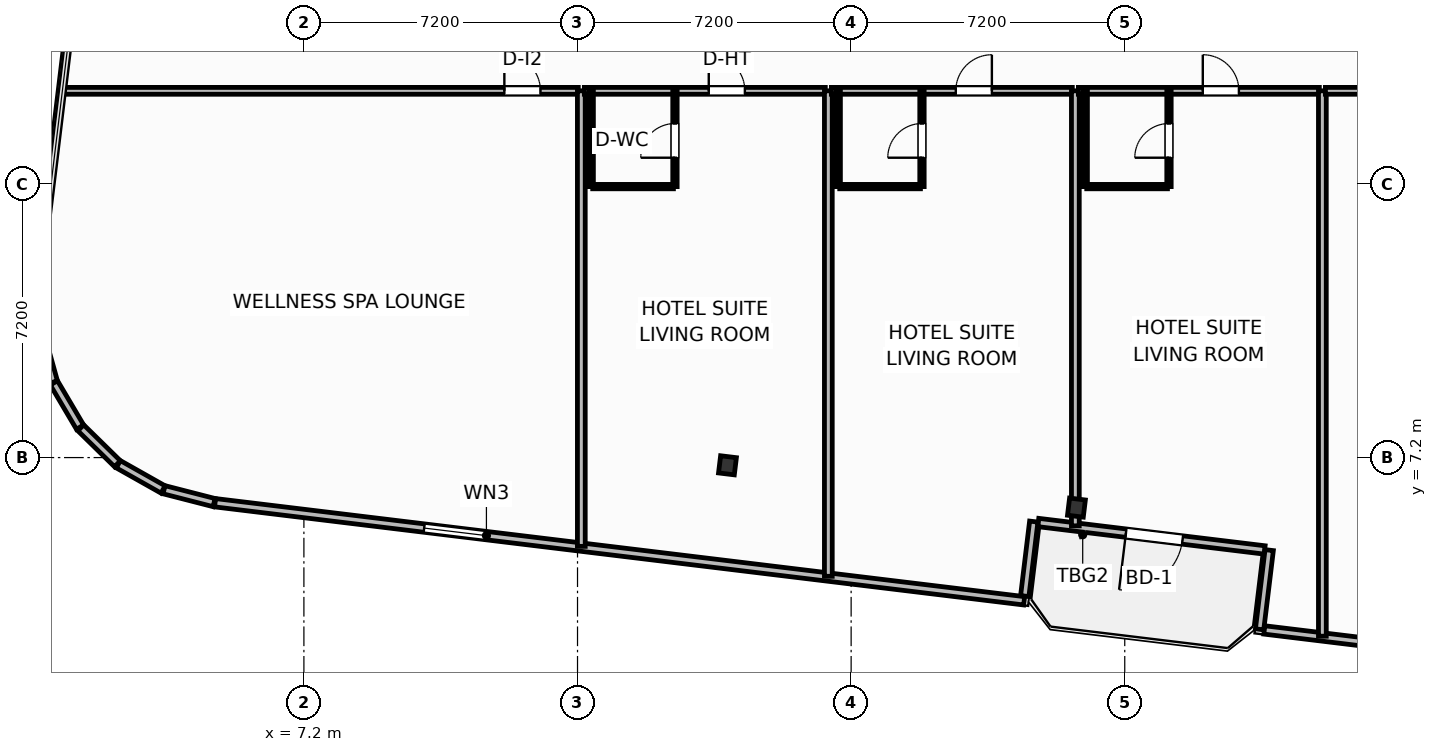
"""IFC4 building model, lengths in metres.
Left out: names, types, materials, properties, quantities, classifications, styles, units other than length and angle.
Written with IfcOpenShell. Run it as: python <this file> out.ifc"""

import sys

from ifc_helpers import new_model, si_unit, direction, frame, frame_2d, origin, origin_2d, place, context, subcontext, project, spatial, rectangle, i_section, extrude, element, fill, save


model = new_model("IFC4")
c1 = context("Model", 3, precision=1e-05, world=origin(), true_north=direction((0.0, 1.0)))
c2 = subcontext(c1, "Body", "Model", "MODEL_VIEW")
j1 = project(units=[si_unit("LENGTHUNIT", "METRE"), si_unit("PLANEANGLEUNIT", "RADIAN")], contexts=[c1])
p1 = place(None, origin())
s1 = spatial("IfcSite", under=j1, at=p1, CompositionType="ELEMENT")
p2 = place(p1, origin())
s2 = spatial("IfcBuilding", under=s1, at=p2, CompositionType="ELEMENT")
p3 = place(p2, frame((0.0, 0.0, 125.4)))
s3 = spatial("IfcBuildingStorey", under=s2, at=p3, CompositionType="ELEMENT", Elevation=125.4)
for number, where, z_axis, x_axis in (
    (1, (18.346, 6.997, 0.0), (0.0, 0.0, 1.0), (0.993, -0.12, 0.0)),
    (2, (27.529, 5.884, 0.0), (0.0, 0.0, 1.0), (0.993, -0.12, 0.0)),
):
    element("IfcColumn", number, at=place(p3, frame(where, z_axis=z_axis, x_axis=x_axis)), inside=s3, PredefinedType="COLUMN", context=c2, shape_type="SweptSolid", body=[
        extrude(i_section(OverallWidth=0.418, OverallDepth=0.455, WebThickness=0.042, FlangeThickness=0.068, FilletRadius=0.025, at=origin_2d()), origin(), (0.0, 0.0, 1.0), 3.7),
    ])
p4 = place(p3, frame((32.48, 4.77, 0.0), z_axis=(0.0, 0.0, 1.0), x_axis=(-0.992735402148, 0.120318000826, 0.0)))
e3 = element("IfcWall", 3, at=p4, inside=s3, PredefinedType="SOLIDWALL", context=c2, shape_type="SweptSolid", body=[
    extrude(rectangle(XDim=6.0, YDim=0.22, at=frame_2d((3.0, 0.0))), origin(), (0.0, 0.0, 1.0), 2.73),
])
p5 = place(p4, frame((2.176, 0.0, 0.0)))
e4 = element("IfcOpeningElement", 4, at=p5, cuts=e3, PredefinedType="OPENING", context=c2, shape_type="SweptSolid", body=[
    extrude(rectangle(XDim=1.5, YDim=2.25, at=frame_2d((0.75, 1.125))), frame((0.0, 0.12, 0.0), z_axis=(0.0, -1.0, 0.0), x_axis=(1.0, 0.0, 0.0)), (0.0, 0.0, 1.0), 0.24),
])
p6 = place(p3, frame((0.245, 10.491, 0.0), z_axis=(0.0, 0.0, 1.0), x_axis=(0.268853470153, -0.963181089716, 0.0)))
e5 = element("IfcWall", 5, at=p6, inside=s3, PredefinedType="SOLIDWALL", context=c2, shape_type="SweptSolid", body=[
    extrude(rectangle(XDim=1.353, YDim=0.22, at=frame_2d((0.677, 0.0))), origin(), (0.0, 0.0, 1.0), 2.73),
])
p7 = place(p3, frame((0.622, 9.166, 0.0), z_axis=(0.0, 0.0, 1.0), x_axis=(0.508911700393, -0.860818727261, 0.0)))
e6 = element("IfcWall", 6, at=p7, inside=s3, PredefinedType="SOLIDWALL", context=c2, shape_type="SweptSolid", body=[
    extrude(rectangle(XDim=1.353, YDim=0.22, at=frame_2d((0.676, 0.0))), origin(), (0.0, 0.0, 1.0), 2.73),
])
p8 = place(p3, frame((1.328, 7.984, 0.0), z_axis=(0.0, 0.0, 1.0), x_axis=(0.714376989847, -0.69976104234, 0.0)))
e7 = element("IfcWall", 7, at=p8, inside=s3, PredefinedType="SOLIDWALL", context=c2, shape_type="SweptSolid", body=[
    extrude(rectangle(XDim=1.353, YDim=0.22, at=frame_2d((0.677, 0.0))), origin(), (0.0, 0.0, 1.0), 2.73),
])
p9 = place(p3, frame((2.316, 7.025, 0.0), z_axis=(0.0, 0.0, 1.0), x_axis=(0.87113677592, -0.491040443996, 0.0)))
e8 = element("IfcWall", 8, at=p9, inside=s3, PredefinedType="SOLIDWALL", context=c2, shape_type="SweptSolid", body=[
    extrude(rectangle(XDim=1.353, YDim=0.22, at=frame_2d((0.677, 0.0))), origin(), (0.0, 0.0, 1.0), 2.73),
])
p10 = place(p3, frame((3.519, 6.354, 0.0), z_axis=(0.0, 0.0, 1.0), x_axis=(0.968506529347, -0.248988157573, 0.0)))
e9 = element("IfcWall", 9, at=p10, inside=s3, PredefinedType="SOLIDWALL", context=c2, shape_type="SweptSolid", body=[
    extrude(rectangle(XDim=1.361, YDim=0.22, at=frame_2d((0.681, 0.0))), origin(), (0.0, 0.0, 1.0), 2.73),
])
p11 = place(p3, frame((4.862, 6.012, 0.0), z_axis=(0.0, 0.0, 1.0), x_axis=(0.99273213367, -0.120344965739, 0.0)))
e10 = element("IfcWall", 10, at=p11, inside=s3, PredefinedType="SOLIDWALL", context=c2, shape_type="SweptSolid", body=[
    extrude(rectangle(XDim=21.447, YDim=0.22, at=frame_2d((10.724, 0.0))), origin(), (0.0, 0.0, 1.0), 2.73),
])
p12 = place(p11, frame((5.543, 0.0, 0.8)))
e11 = element("IfcOpeningElement", 11, at=p12, cuts=e10, PredefinedType="OPENING", context=c2, shape_type="SweptSolid", body=[
    extrude(rectangle(XDim=1.65, YDim=1.65, at=frame_2d((0.825, 0.825))), frame((0.0, 0.12, 0.0), z_axis=(0.0, -1.0, 0.0), x_axis=(1.0, 0.0, 0.0)), (0.0, 0.0, 1.0), 0.24),
])
p13 = place(p3, frame((26.168, 3.555, 0.0), z_axis=(0.0, 0.0, 1.0), x_axis=(0.120290754542, 0.992738703976, 0.0)))
e12 = element("IfcWall", 12, at=p13, inside=s3, PredefinedType="SOLIDWALL", context=c2, shape_type="SweptSolid", body=[
    extrude(rectangle(XDim=1.975, YDim=0.22, at=frame_2d((0.987, 0.0))), origin(), (0.0, 0.0, 1.0), 2.73),
])
p14 = place(p3, frame((32.601, 4.765, 0.0), z_axis=(0.0, 0.0, 1.0), x_axis=(-0.120327895535, -0.992734202874, 0.0)))
e13 = element("IfcWall", 13, at=p14, inside=s3, PredefinedType="SOLIDWALL", context=c2, shape_type="SweptSolid", body=[
    extrude(rectangle(XDim=2.1, YDim=0.22, at=frame_2d((1.05, 0.0))), origin(), (0.0, 0.0, 1.0), 2.73),
])
p15 = place(p3, frame((32.472, 2.665, 0.0), z_axis=(0.0, 0.0, 1.0), x_axis=(0.992734661931, -0.120324108143, 0.0)))
e14 = element("IfcWall", 14, at=p15, inside=s3, PredefinedType="SOLIDWALL", context=c2, shape_type="SweptSolid", body=[
    extrude(rectangle(XDim=8.035, YDim=0.22, at=frame_2d((4.018, 0.0))), origin(), (0.0, 0.0, 1.0), 2.73),
])
p16 = place(p15, frame((3.192, 0.0, 0.8)))
e15 = element("IfcOpeningElement", 15, at=p16, cuts=e14, PredefinedType="OPENING", context=c2, shape_type="SweptSolid", body=[
    extrude(rectangle(XDim=1.65, YDim=1.65, at=frame_2d((0.825, 0.825))), frame((0.0, 0.12, 0.0), z_axis=(0.0, -1.0, 0.0), x_axis=(1.0, 0.0, 0.0)), (0.0, 0.0, 1.0), 0.24),
])
p17 = place(p3, frame((0.884, 16.85, 0.0), z_axis=(0.0, 0.0, 1.0), x_axis=(1.0, 0.0, 0.0)))
e16 = element("IfcWall", 16, at=p17, inside=s3, PredefinedType="PARTITIONING", context=c2, shape_type="SweptSolid", body=[
    extrude(rectangle(XDim=13.536, YDim=0.18, at=frame_2d((6.768, 0.0))), origin(), (0.0, 0.0, 1.0), 3.45),
])
p18 = place(p17, frame((11.591, 0.0, 0.0)))
e17 = element("IfcOpeningElement", 17, at=p18, cuts=e16, PredefinedType="OPENING", context=c2, shape_type="SweptSolid", body=[
    extrude(rectangle(XDim=0.95, YDim=2.05, at=frame_2d((0.475, 1.025))), frame((0.0, 0.1, 0.0), z_axis=(0.0, -1.0, 0.0), x_axis=(1.0, 0.0, 0.0)), (0.0, 0.0, 1.0), 0.2),
])
p19 = place(p3, frame((14.5, 4.864, 0.0), z_axis=(0.0, 0.0, 1.0), x_axis=(0.0, 1.0, 0.0)))
e18 = element("IfcWall", 18, at=p19, inside=s3, PredefinedType="PARTITIONING", context=c2, shape_type="SweptSolid", body=[
    extrude(rectangle(XDim=11.986, YDim=0.205, at=frame_2d((5.993, 0.0))), origin(), (0.0, 0.0, 1.0), 3.45),
])
p20 = place(p3, frame((14.58, 16.85, 0.0), z_axis=(0.0, 0.0, 1.0), x_axis=(1.0, 0.0, 0.0)))
e19 = element("IfcWall", 19, at=p20, inside=s3, PredefinedType="PARTITIONING", context=c2, shape_type="SweptSolid", body=[
    extrude(rectangle(XDim=6.34, YDim=0.18, at=frame_2d((3.17, 0.0))), origin(), (0.0, 0.0, 1.0), 3.45),
])
p21 = place(p20, frame((3.274, 0.0, 0.0)))
e20 = element("IfcOpeningElement", 20, at=p21, cuts=e19, PredefinedType="OPENING", context=c2, shape_type="SweptSolid", body=[
    extrude(rectangle(XDim=0.95, YDim=2.15, at=frame_2d((0.475, 1.075))), frame((0.0, 0.1, 0.0), z_axis=(0.0, -1.0, 0.0), x_axis=(1.0, 0.0, 0.0)), (0.0, 0.0, 1.0), 0.2),
])
p22 = place(p3, frame((14.8, 14.33, 0.0), z_axis=(0.0, 0.0, 1.0), x_axis=(1.0, 0.0, 0.0)))
e21 = element("IfcWall", 21, at=p22, inside=s3, PredefinedType="PARTITIONING", context=c2, shape_type="SweptSolid", body=[
    extrude(rectangle(XDim=2.124, YDim=0.115, at=frame_2d((1.062, 0.0))), origin(), (0.0, 0.0, 1.0), 3.45),
])
p23 = place(p3, frame((16.964, 14.33, 0.0), z_axis=(0.0, 0.0, 1.0), x_axis=(0.0, 1.0, 0.0)))
e22 = element("IfcWall", 22, at=p23, inside=s3, PredefinedType="PARTITIONING", context=c2, shape_type="SweptSolid", body=[
    extrude(rectangle(XDim=2.52, YDim=0.115, at=frame_2d((1.26, 0.0))), origin(), (0.0, 0.0, 1.0), 3.45),
])
p24 = place(p23, frame((0.76, 0.0, 0.0)))
e23 = element("IfcOpeningElement", 23, at=p24, cuts=e22, PredefinedType="OPENING", context=c2, shape_type="SweptSolid", body=[
    extrude(rectangle(XDim=0.9, YDim=2.05, at=frame_2d((0.45, 1.025))), frame((0.0, 0.067, 0.0), z_axis=(0.0, -1.0, 0.0), x_axis=(1.0, 0.0, 0.0)), (0.0, 0.0, 1.0), 0.135),
])
p25 = place(p3, frame((14.76, 14.33, 0.0), z_axis=(0.0, 0.0, 1.0), x_axis=(0.0, 1.0, 0.0)))
e24 = element("IfcWall", 24, at=p25, inside=s3, PredefinedType="PARTITIONING", context=c2, shape_type="SweptSolid", body=[
    extrude(rectangle(XDim=2.52, YDim=0.115, at=frame_2d((1.26, 0.0))), origin(), (0.0, 0.0, 1.0), 3.45),
])
p26 = place(p3, frame((21.0, 4.076, 0.0), z_axis=(0.0, 0.0, 1.0), x_axis=(0.0, 1.0, 0.0)))
e25 = element("IfcWall", 25, at=p26, inside=s3, PredefinedType="PARTITIONING", context=c2, shape_type="SweptSolid", body=[
    extrude(rectangle(XDim=12.774, YDim=0.205, at=frame_2d((6.387, 0.0))), origin(), (0.0, 0.0, 1.0), 3.45),
])
p27 = place(p3, frame((21.08, 16.85, 0.0), z_axis=(0.0, 0.0, 1.0), x_axis=(1.0, 0.0, 0.0)))
e26 = element("IfcWall", 26, at=p27, inside=s3, PredefinedType="PARTITIONING", context=c2, shape_type="SweptSolid", body=[
    extrude(rectangle(XDim=6.34, YDim=0.18, at=frame_2d((3.17, 0.0))), origin(), (0.0, 0.0, 1.0), 3.45),
])
p28 = place(p27, frame((3.274, 0.0, 0.0)))
e27 = element("IfcOpeningElement", 27, at=p28, cuts=e26, PredefinedType="OPENING", context=c2, shape_type="SweptSolid", body=[
    extrude(rectangle(XDim=0.95, YDim=2.15, at=frame_2d((0.475, 1.075))), frame((0.0, 0.1, 0.0), z_axis=(0.0, -1.0, 0.0), x_axis=(1.0, 0.0, 0.0)), (0.0, 0.0, 1.0), 0.2),
])
p29 = place(p3, frame((21.3, 14.33, 0.0), z_axis=(0.0, 0.0, 1.0), x_axis=(1.0, 0.0, 0.0)))
e28 = element("IfcWall", 28, at=p29, inside=s3, PredefinedType="PARTITIONING", context=c2, shape_type="SweptSolid", body=[
    extrude(rectangle(XDim=2.124, YDim=0.115, at=frame_2d((1.062, 0.0))), origin(), (0.0, 0.0, 1.0), 3.45),
])
p30 = place(p3, frame((23.464, 14.33, 0.0), z_axis=(0.0, 0.0, 1.0), x_axis=(0.0, 1.0, 0.0)))
e29 = element("IfcWall", 29, at=p30, inside=s3, PredefinedType="PARTITIONING", context=c2, shape_type="SweptSolid", body=[
    extrude(rectangle(XDim=2.52, YDim=0.115, at=frame_2d((1.26, 0.0))), origin(), (0.0, 0.0, 1.0), 3.45),
])
p31 = place(p30, frame((0.76, 0.0, 0.0)))
e30 = element("IfcOpeningElement", 30, at=p31, cuts=e29, PredefinedType="OPENING", context=c2, shape_type="SweptSolid", body=[
    extrude(rectangle(XDim=0.9, YDim=2.05, at=frame_2d((0.45, 1.025))), frame((0.0, 0.067, 0.0), z_axis=(0.0, -1.0, 0.0), x_axis=(1.0, 0.0, 0.0)), (0.0, 0.0, 1.0), 0.135),
])
p32 = place(p3, frame((21.26, 14.33, 0.0), z_axis=(0.0, 0.0, 1.0), x_axis=(0.0, 1.0, 0.0)))
e31 = element("IfcWall", 31, at=p32, inside=s3, PredefinedType="PARTITIONING", context=c2, shape_type="SweptSolid", body=[
    extrude(rectangle(XDim=2.52, YDim=0.115, at=frame_2d((1.26, 0.0))), origin(), (0.0, 0.0, 1.0), 3.45),
])
p33 = place(p3, frame((27.5, 5.403, 0.0), z_axis=(0.0, 0.0, 1.0), x_axis=(0.0, 1.0, 0.0)))
e32 = element("IfcWall", 32, at=p33, inside=s3, PredefinedType="PARTITIONING", context=c2, shape_type="SweptSolid", body=[
    extrude(rectangle(XDim=11.447, YDim=0.205, at=frame_2d((5.723, 0.0))), origin(), (0.0, 0.0, 1.0), 2.662),
])
p34 = place(p3, frame((27.58, 16.85, 0.0), z_axis=(0.0, 0.0, 1.0), x_axis=(1.0, 0.0, 0.0)))
e33 = element("IfcWall", 33, at=p34, inside=s3, PredefinedType="PARTITIONING", context=c2, shape_type="SweptSolid", body=[
    extrude(rectangle(XDim=6.34, YDim=0.18, at=frame_2d((3.17, 0.0))), origin(), (0.0, 0.0, 1.0), 3.45),
])
p35 = place(p34, frame((3.274, 0.0, 0.0)))
e34 = element("IfcOpeningElement", 34, at=p35, cuts=e33, PredefinedType="OPENING", context=c2, shape_type="SweptSolid", body=[
    extrude(rectangle(XDim=0.95, YDim=2.15, at=frame_2d((0.475, 1.075))), frame((0.0, 0.1, 0.0), z_axis=(0.0, -1.0, 0.0), x_axis=(1.0, 0.0, 0.0)), (0.0, 0.0, 1.0), 0.2),
])
p36 = place(p3, frame((27.8, 14.33, 0.0), z_axis=(0.0, 0.0, 1.0), x_axis=(1.0, 0.0, 0.0)))
e35 = element("IfcWall", 35, at=p36, inside=s3, PredefinedType="PARTITIONING", context=c2, shape_type="SweptSolid", body=[
    extrude(rectangle(XDim=2.124, YDim=0.115, at=frame_2d((1.062, 0.0))), origin(), (0.0, 0.0, 1.0), 3.45),
])
p37 = place(p3, frame((29.964, 14.33, 0.0), z_axis=(0.0, 0.0, 1.0), x_axis=(0.0, 1.0, 0.0)))
e36 = element("IfcWall", 36, at=p37, inside=s3, PredefinedType="PARTITIONING", context=c2, shape_type="SweptSolid", body=[
    extrude(rectangle(XDim=2.52, YDim=0.115, at=frame_2d((1.26, 0.0))), origin(), (0.0, 0.0, 1.0), 3.45),
])
p38 = place(p37, frame((0.76, 0.0, 0.0)))
e37 = element("IfcOpeningElement", 37, at=p38, cuts=e36, PredefinedType="OPENING", context=c2, shape_type="SweptSolid", body=[
    extrude(rectangle(XDim=0.9, YDim=2.05, at=frame_2d((0.45, 1.025))), frame((0.0, 0.067, 0.0), z_axis=(0.0, -1.0, 0.0), x_axis=(1.0, 0.0, 0.0)), (0.0, 0.0, 1.0), 0.135),
])
p39 = place(p3, frame((27.76, 14.33, 0.0), z_axis=(0.0, 0.0, 1.0), x_axis=(0.0, 1.0, 0.0)))
e38 = element("IfcWall", 38, at=p39, inside=s3, PredefinedType="PARTITIONING", context=c2, shape_type="SweptSolid", body=[
    extrude(rectangle(XDim=2.52, YDim=0.115, at=frame_2d((1.26, 0.0))), origin(), (0.0, 0.0, 1.0), 3.45),
])
p40 = place(p3, frame((34.0, 2.5, 0.0), z_axis=(0.0, 0.0, 1.0), x_axis=(0.0, 1.0, 0.0)))
e39 = element("IfcWall", 39, at=p40, inside=s3, PredefinedType="PARTITIONING", context=c2, shape_type="SweptSolid", body=[
    extrude(rectangle(XDim=14.35, YDim=0.205, at=frame_2d((7.175, 0.0))), origin(), (0.0, 0.0, 1.0), 3.45),
])
p41 = place(p3, frame((34.08, 16.85, 0.0), z_axis=(0.0, 0.0, 1.0), x_axis=(1.0, 0.0, 0.0)))
e40 = element("IfcWall", 40, at=p41, inside=s3, PredefinedType="PARTITIONING", context=c2, shape_type="SweptSolid", body=[
    extrude(rectangle(XDim=6.34, YDim=0.18, at=frame_2d((3.17, 0.0))), origin(), (0.0, 0.0, 1.0), 3.45),
])
p42 = place(p41, frame((0.91, 0.0, 0.0)))
e41 = element("IfcOpeningElement", 41, at=p42, cuts=e40, PredefinedType="OPENING", context=c2, shape_type="SweptSolid", body=[
    extrude(rectangle(XDim=0.95, YDim=2.15, at=frame_2d((0.475, 1.075))), frame((0.0, 0.1, 0.0), z_axis=(0.0, -1.0, 0.0), x_axis=(1.0, 0.0, 0.0)), (0.0, 0.0, 1.0), 0.2),
])
p43 = place(p5, origin())
e42 = element("IfcDoor", 42, at=p43, inside=s3, OperationType="SINGLE_SWING_RIGHT", PredefinedType="DOOR", context=c2, shape_type="SweptSolid", body=[
    extrude(rectangle(XDim=1.5, YDim=2.25, at=frame_2d((0.75, 1.125))), frame((0.0, 0.025, 0.0), z_axis=(0.0, -1.0, 0.0), x_axis=(1.0, 0.0, 0.0)), (0.0, 0.0, 1.0), 0.05),
])
fill(e4, e42)
p44 = place(p12, origin())
e43 = element("IfcWindow", 43, at=p44, inside=s3, PartitioningType="SINGLE_PANEL", PredefinedType="WINDOW", context=c2, shape_type="SweptSolid", body=[
    extrude(rectangle(XDim=1.65, YDim=1.65, at=frame_2d((0.825, 0.825))), frame((0.0, 0.03, 0.0), z_axis=(0.0, -1.0, 0.0), x_axis=(1.0, 0.0, 0.0)), (0.0, 0.0, 1.0), 0.06),
])
fill(e11, e43)
p45 = place(p18, origin())
e44 = element("IfcDoor", 44, at=p45, inside=s3, OperationType="SINGLE_SWING_LEFT", PredefinedType="DOOR", context=c2, shape_type="SweptSolid", body=[
    extrude(rectangle(XDim=0.95, YDim=2.05, at=frame_2d((0.475, 1.025))), frame((0.0, 0.025, 0.0), z_axis=(0.0, -1.0, 0.0), x_axis=(1.0, 0.0, 0.0)), (0.0, 0.0, 1.0), 0.05),
])
fill(e17, e44)
p46 = place(p21, origin())
e45 = element("IfcDoor", 45, at=p46, inside=s3, OperationType="SINGLE_SWING_LEFT", PredefinedType="DOOR", context=c2, shape_type="SweptSolid", body=[
    extrude(rectangle(XDim=0.95, YDim=2.15, at=frame_2d((0.475, 1.075))), frame((0.0, 0.025, 0.0), z_axis=(0.0, -1.0, 0.0), x_axis=(1.0, 0.0, 0.0)), (0.0, 0.0, 1.0), 0.05),
])
fill(e20, e45)
p47 = place(p24, origin())
e46 = element("IfcDoor", 46, at=p47, inside=s3, OperationType="SINGLE_SWING_LEFT", PredefinedType="DOOR", context=c2, shape_type="SweptSolid", body=[
    extrude(rectangle(XDim=0.9, YDim=2.05, at=frame_2d((0.45, 1.025))), frame((0.0, 0.025, 0.0), z_axis=(0.0, -1.0, 0.0), x_axis=(1.0, 0.0, 0.0)), (0.0, 0.0, 1.0), 0.05),
])
fill(e23, e46)
p48 = place(p28, origin())
e47 = element("IfcDoor", 47, at=p48, inside=s3, OperationType="SINGLE_SWING_RIGHT", PredefinedType="DOOR", context=c2, shape_type="SweptSolid", body=[
    extrude(rectangle(XDim=0.95, YDim=2.15, at=frame_2d((0.475, 1.075))), frame((0.0, 0.025, 0.0), z_axis=(0.0, -1.0, 0.0), x_axis=(1.0, 0.0, 0.0)), (0.0, 0.0, 1.0), 0.05),
])
fill(e27, e47)
p49 = place(p31, origin())
e48 = element("IfcDoor", 48, at=p49, inside=s3, OperationType="SINGLE_SWING_LEFT", PredefinedType="DOOR", context=c2, shape_type="SweptSolid", body=[
    extrude(rectangle(XDim=0.9, YDim=2.05, at=frame_2d((0.45, 1.025))), frame((0.0, 0.025, 0.0), z_axis=(0.0, -1.0, 0.0), x_axis=(1.0, 0.0, 0.0)), (0.0, 0.0, 1.0), 0.05),
])
fill(e30, e48)
p50 = place(p35, origin())
e49 = element("IfcDoor", 49, at=p50, inside=s3, OperationType="SINGLE_SWING_LEFT", PredefinedType="DOOR", context=c2, shape_type="SweptSolid", body=[
    extrude(rectangle(XDim=0.95, YDim=2.15, at=frame_2d((0.475, 1.075))), frame((0.0, 0.025, 0.0), z_axis=(0.0, -1.0, 0.0), x_axis=(1.0, 0.0, 0.0)), (0.0, 0.0, 1.0), 0.05),
])
fill(e34, e49)
p51 = place(p38, origin())
e50 = element("IfcDoor", 50, at=p51, inside=s3, OperationType="SINGLE_SWING_LEFT", PredefinedType="DOOR", context=c2, shape_type="SweptSolid", body=[
    extrude(rectangle(XDim=0.9, YDim=2.05, at=frame_2d((0.45, 1.025))), frame((0.0, 0.025, 0.0), z_axis=(0.0, -1.0, 0.0), x_axis=(1.0, 0.0, 0.0)), (0.0, 0.0, 1.0), 0.05),
])
fill(e37, e50)
save(model, sys.argv[1])
